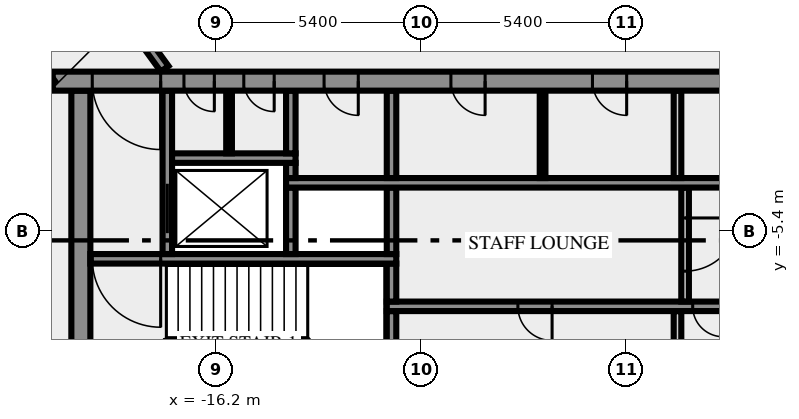
"""IFC4 building model, lengths in metres.
Left out: names, types, materials, properties, quantities, classifications, styles, units other than length and angle.
Written with IfcOpenShell. Run it as: python <this file> out.ifc"""

import sys

from ifc_helpers import new_model, si_unit, direction, frame, frame_2d, origin, place, context, subcontext, project, spatial, rectangle, extrude, element, fill, save


model = new_model("IFC4")
c1 = context("Model", 3, precision=1e-05, world=origin(), true_north=direction((0.0, 1.0)))
c2 = subcontext(c1, "Body", "Model", "MODEL_VIEW")
j1 = project(units=[si_unit("LENGTHUNIT", "METRE"), si_unit("PLANEANGLEUNIT", "RADIAN")], contexts=[c1])
p1 = place(None, origin())
s1 = spatial("IfcSite", under=j1, at=p1, CompositionType="ELEMENT")
p2 = place(p1, origin())
s2 = spatial("IfcBuilding", under=s1, at=p2, CompositionType="ELEMENT")
p3 = place(p2, frame((0.0, 0.0, 230.0)))
s3 = spatial("IfcBuildingStorey", under=s2, at=p3, CompositionType="ELEMENT", Elevation=230.0)
p4 = place(p3, frame((-19.75, -10.5, 0.0), z_axis=(0.0, 0.0, 1.0), x_axis=(0.0, 1.0, 0.0)))
e1 = element("IfcWall", 1, at=p4, inside=s3, PredefinedType="SHEAR", context=c2, shape_type="SweptSolid", body=[
    extrude(rectangle(XDim=8.8, YDim=0.5, at=frame_2d((4.4, 0.0))), origin(), (0.0, 0.0, 1.0), 3.65),
])
p5 = place(p3, frame((-11.575, -10.5, 0.0), z_axis=(0.0, 0.0, 1.0), x_axis=(0.0, 1.0, 0.0)))
e2 = element("IfcWall", 2, at=p5, inside=s3, PredefinedType="SHEAR", context=c2, shape_type="SweptSolid", body=[
    extrude(rectangle(XDim=3.0, YDim=0.25, at=frame_2d((1.5, 0.0))), origin(), (0.0, 0.0, 1.0), 3.65),
])
p6 = place(p3, frame((-4.05, -10.5, 0.0), z_axis=(0.0, 0.0, 1.0), x_axis=(0.0, 1.0, 0.0)))
e3 = element("IfcWall", 3, at=p6, inside=s3, PredefinedType="SOLIDWALL", context=c2, shape_type="SweptSolid", body=[
    extrude(rectangle(XDim=3.0, YDim=0.2, at=frame_2d((1.5, 0.0))), origin(), (0.0, 0.0, 1.0), 3.65),
])
p7 = place(p3, frame((11.7, -7.375, 0.0), z_axis=(0.0, 0.0, 1.0), x_axis=(-1.0, 0.0, 0.0)))
e4 = element("IfcWall", 4, at=p7, inside=s3, PredefinedType="SHEAR", context=c2, shape_type="SweptSolid", body=[
    extrude(rectangle(XDim=23.4, YDim=0.25, at=frame_2d((11.7, 0.0))), origin(), (0.0, 0.0, 1.0), 3.65),
])
p8 = place(p7, frame((19.05, 0.0, 0.0)))
e5 = element("IfcOpeningElement", 5, at=p8, cuts=e4, PredefinedType="OPENING", context=c2, shape_type="SweptSolid", body=[
    extrude(rectangle(XDim=0.9, YDim=2.1, at=frame_2d((0.45, 1.05))), frame((0.0, 0.135, 0.0), z_axis=(0.0, -1.0, 0.0), x_axis=(1.0, 0.0, 0.0)), (0.0, 0.0, 1.0), 0.27),
])
p9 = place(p7, frame((14.55, 0.0, 0.0)))
e6 = element("IfcOpeningElement", 6, at=p9, cuts=e4, PredefinedType="OPENING", context=c2, shape_type="SweptSolid", body=[
    extrude(rectangle(XDim=0.8, YDim=2.1, at=frame_2d((0.4, 1.05))), frame((0.0, 0.135, 0.0), z_axis=(0.0, -1.0, 0.0), x_axis=(1.0, 0.0, 0.0)), (0.0, 0.0, 1.0), 0.27),
])
p10 = place(p7, frame((12.8, 0.0, 0.0)))
e7 = element("IfcOpeningElement", 7, at=p10, cuts=e4, PredefinedType="OPENING", context=c2, shape_type="SweptSolid", body=[
    extrude(rectangle(XDim=0.9, YDim=2.1, at=frame_2d((0.45, 1.05))), frame((0.0, 0.135, 0.0), z_axis=(0.0, -1.0, 0.0), x_axis=(1.0, 0.0, 0.0)), (0.0, 0.0, 1.0), 0.27),
])
p11 = place(p7, frame((10.7, 0.0, 0.0)))
e8 = element("IfcOpeningElement", 8, at=p11, cuts=e4, PredefinedType="OPENING", context=c2, shape_type="SweptSolid", body=[
    extrude(rectangle(XDim=0.9, YDim=2.1, at=frame_2d((0.45, 1.05))), frame((0.0, 0.135, 0.0), z_axis=(0.0, -1.0, 0.0), x_axis=(1.0, 0.0, 0.0)), (0.0, 0.0, 1.0), 0.27),
])
p12 = place(p7, frame((8.35, 0.0, 0.0)))
e9 = element("IfcOpeningElement", 9, at=p12, cuts=e4, PredefinedType="OPENING", context=c2, shape_type="SweptSolid", body=[
    extrude(rectangle(XDim=1.1, YDim=2.1, at=frame_2d((0.55, 1.05))), frame((0.0, 0.135, 0.0), z_axis=(0.0, -1.0, 0.0), x_axis=(1.0, 0.0, 0.0)), (0.0, 0.0, 1.0), 0.27),
])
p13 = place(p7, frame((5.85, 0.0, 0.0)))
e10 = element("IfcOpeningElement", 10, at=p13, cuts=e4, PredefinedType="OPENING", context=c2, shape_type="SweptSolid", body=[
    extrude(rectangle(XDim=1.1, YDim=2.1, at=frame_2d((0.55, 1.05))), frame((0.0, 0.135, 0.0), z_axis=(0.0, -1.0, 0.0), x_axis=(1.0, 0.0, 0.0)), (0.0, 0.0, 1.0), 0.27),
])
p14 = place(p7, frame((3.35, 0.0, 0.0)))
e11 = element("IfcOpeningElement", 11, at=p14, cuts=e4, PredefinedType="OPENING", context=c2, shape_type="SweptSolid", body=[
    extrude(rectangle(XDim=1.1, YDim=2.1, at=frame_2d((0.55, 1.05))), frame((0.0, 0.135, 0.0), z_axis=(0.0, -1.0, 0.0), x_axis=(1.0, 0.0, 0.0)), (0.0, 0.0, 1.0), 0.27),
])
p15 = place(p7, frame((0.85, 0.0, 0.0)))
e12 = element("IfcOpeningElement", 12, at=p15, cuts=e4, PredefinedType="OPENING", context=c2, shape_type="SweptSolid", body=[
    extrude(rectangle(XDim=1.1, YDim=2.1, at=frame_2d((0.55, 1.05))), frame((0.0, 0.135, 0.0), z_axis=(0.0, -1.0, 0.0), x_axis=(1.0, 0.0, 0.0)), (0.0, 0.0, 1.0), 0.27),
])
p16 = place(p3, frame((-11.575, -7.25, 0.0), z_axis=(0.0, 0.0, 1.0), x_axis=(0.0, 1.0, 0.0)))
e13 = element("IfcWall", 13, at=p16, inside=s3, PredefinedType="SHEAR", context=c2, shape_type="SweptSolid", body=[
    extrude(rectangle(XDim=1.0, YDim=0.25, at=frame_2d((0.5, 0.0))), origin(), (0.0, 0.0, 1.0), 3.65),
])
p17 = place(p3, frame((-3.85, -4.25, 0.0), z_axis=(0.0, 0.0, 1.0), x_axis=(0.0, -1.0, 0.0)))
e14 = element("IfcWall", 14, at=p17, inside=s3, PredefinedType="SOLIDWALL", context=c2, shape_type="SweptSolid", body=[
    extrude(rectangle(XDim=3.0, YDim=0.2, at=frame_2d((1.5, 0.0))), origin(), (0.0, 0.0, 1.0), 3.65),
])
p18 = place(p17, frame((0.8, 0.0, 0.0)))
e15 = element("IfcOpeningElement", 15, at=p18, cuts=e14, PredefinedType="OPENING", context=c2, shape_type="SweptSolid", body=[
    extrude(rectangle(XDim=1.4, YDim=2.1, at=frame_2d((0.7, 1.05))), frame((0.0, 0.11, 0.0), z_axis=(0.0, -1.0, 0.0), x_axis=(1.0, 0.0, 0.0)), (0.0, 0.0, 1.0), 0.22),
])
p19 = place(p3, frame((-11.45, -6.125, 0.0), z_axis=(0.0, 0.0, 1.0), x_axis=(-1.0, 0.0, 0.0)))
e16 = element("IfcWall", 16, at=p19, inside=s3, PredefinedType="SHEAR", context=c2, shape_type="SweptSolid", body=[
    extrude(rectangle(XDim=8.05, YDim=0.25, at=frame_2d((4.025, 0.0))), origin(), (0.0, 0.0, 1.0), 3.65),
])
p20 = place(p19, frame((6.2, 0.0, 0.0)))
e17 = element("IfcOpeningElement", 17, at=p20, cuts=e16, PredefinedType="OPENING", context=c2, shape_type="SweptSolid", body=[
    extrude(rectangle(XDim=1.8, YDim=2.1, at=frame_2d((0.9, 1.05))), frame((0.0, 0.135, 0.0), z_axis=(0.0, -1.0, 0.0), x_axis=(1.0, 0.0, 0.0)), (0.0, 0.0, 1.0), 0.27),
])
p21 = place(p3, frame((-17.475, -6.0, 0.0), z_axis=(0.0, 0.0, 1.0), x_axis=(0.0, 1.0, 0.0)))
e18 = element("IfcWall", 18, at=p21, inside=s3, PredefinedType="SHEAR", context=c2, shape_type="SweptSolid", body=[
    extrude(rectangle(XDim=4.3, YDim=0.25, at=frame_2d((2.15, 0.0))), origin(), (0.0, 0.0, 1.0), 3.65),
])
p22 = place(p21, frame((0.55, 0.0, 0.0)))
e19 = element("IfcOpeningElement", 19, at=p22, cuts=e18, PredefinedType="OPENING", context=c2, shape_type="SweptSolid", body=[
    extrude(rectangle(XDim=1.3, YDim=2.1, at=frame_2d((0.65, 1.05))), frame((0.0, 0.135, 0.0), z_axis=(0.0, -1.0, 0.0), x_axis=(1.0, 0.0, 0.0)), (0.0, 0.0, 1.0), 0.27),
])
for number, where, z_axis, x_axis in (
    (20, (-14.225, -6.0, 0.0), (0.0, 0.0, 1.0), (0.0, 1.0, 0.0)),
    (21, (-11.575, -6.0, 0.0), (0.0, 0.0, 1.0), (0.0, 1.0, 0.0)),
):
    element("IfcWall", number, at=place(p3, frame(where, z_axis=z_axis, x_axis=x_axis)), inside=s3, PredefinedType="SHEAR", context=c2, shape_type="SweptSolid", body=[
        extrude(rectangle(XDim=1.75, YDim=0.25, at=frame_2d((0.875, 0.0))), origin(), (0.0, 0.0, 1.0), 3.65),
    ])
p23 = place(p3, frame((-14.35, -4.125, 0.0), z_axis=(0.0, 0.0, 1.0), x_axis=(1.0, 0.0, 0.0)))
e22 = element("IfcWall", 22, at=p23, inside=s3, PredefinedType="SHEAR", context=c2, shape_type="SweptSolid", body=[
    extrude(rectangle(XDim=12.7, YDim=0.25, at=frame_2d((6.35, 0.0))), origin(), (0.0, 0.0, 1.0), 3.65),
])
p24 = place(p3, frame((-14.225, -4.0, 0.0), z_axis=(0.0, 0.0, 1.0), x_axis=(0.0, 1.0, 0.0)))
e23 = element("IfcWall", 23, at=p24, inside=s3, PredefinedType="SHEAR", context=c2, shape_type="SweptSolid", body=[
    extrude(rectangle(XDim=0.4, YDim=0.25, at=frame_2d((0.2, 0.0))), origin(), (0.0, 0.0, 1.0), 3.65),
])
p25 = place(p3, frame((-11.575, -4.0, 0.0), z_axis=(0.0, 0.0, 1.0), x_axis=(0.0, 1.0, 0.0)))
e24 = element("IfcWall", 24, at=p25, inside=s3, PredefinedType="SHEAR", context=c2, shape_type="SweptSolid", body=[
    extrude(rectangle(XDim=2.3, YDim=0.25, at=frame_2d((1.15, 0.0))), origin(), (0.0, 0.0, 1.0), 3.65),
])
p26 = place(p3, frame((-7.6, -4.0, 0.0), z_axis=(0.0, 0.0, 1.0), x_axis=(0.0, 1.0, 0.0)))
e25 = element("IfcWall", 25, at=p26, inside=s3, PredefinedType="PARTITIONING", context=c2, shape_type="SweptSolid", body=[
    extrude(rectangle(XDim=2.3, YDim=0.15, at=frame_2d((1.15, 0.0))), origin(), (0.0, 0.0, 1.0), 3.65),
])
p27 = place(p3, frame((-4.05, -4.0, 0.0), z_axis=(0.0, 0.0, 1.0), x_axis=(0.0, 1.0, 0.0)))
e26 = element("IfcWall", 26, at=p27, inside=s3, PredefinedType="SOLIDWALL", context=c2, shape_type="SweptSolid", body=[
    extrude(rectangle(XDim=2.3, YDim=0.2, at=frame_2d((1.15, 0.0))), origin(), (0.0, 0.0, 1.0), 3.65),
])
p28 = place(p3, frame((-17.35, -3.475, 0.0), z_axis=(0.0, 0.0, 1.0), x_axis=(1.0, 0.0, 0.0)))
e27 = element("IfcWall", 27, at=p28, inside=s3, PredefinedType="SHEAR", context=c2, shape_type="SweptSolid", body=[
    extrude(rectangle(XDim=3.25, YDim=0.25, at=frame_2d((1.625, 0.0))), origin(), (0.0, 0.0, 1.0), 3.65),
])
p29 = place(p3, frame((-15.85, -3.35, 0.0), z_axis=(0.0, 0.0, 1.0), x_axis=(0.0, 1.0, 0.0)))
e28 = element("IfcWall", 28, at=p29, inside=s3, PredefinedType="PARTITIONING", context=c2, shape_type="SweptSolid", body=[
    extrude(rectangle(XDim=1.65, YDim=0.15, at=frame_2d((0.825, 0.0))), origin(), (0.0, 0.0, 1.0), 3.65),
])
p30 = place(p3, frame((-14.225, -3.35, 0.0), z_axis=(0.0, 0.0, 1.0), x_axis=(0.0, 1.0, 0.0)))
e29 = element("IfcWall", 29, at=p30, inside=s3, PredefinedType="SHEAR", context=c2, shape_type="SweptSolid", body=[
    extrude(rectangle(XDim=1.65, YDim=0.25, at=frame_2d((0.825, 0.0))), origin(), (0.0, 0.0, 1.0), 3.65),
])
p31 = place(p3, frame((20.49, -1.45, 0.0), z_axis=(0.0, 0.0, 1.0), x_axis=(-1.0, 0.0, 0.0)))
e30 = element("IfcWall", 30, at=p31, inside=s3, PredefinedType="SHEAR", context=c2, shape_type="SweptSolid", body=[
    extrude(rectangle(XDim=40.98, YDim=0.5, at=frame_2d((20.49, 0.0))), origin(), (0.0, 0.0, 1.0), 3.65),
])
p32 = place(p31, frame((38.14, 0.0, 0.0)))
e31 = element("IfcOpeningElement", 31, at=p32, cuts=e30, PredefinedType="OPENING", context=c2, shape_type="SweptSolid", body=[
    extrude(rectangle(XDim=1.8, YDim=2.1, at=frame_2d((0.9, 1.05))), frame((0.0, 0.26, 0.0), z_axis=(0.0, -1.0, 0.0), x_axis=(1.0, 0.0, 0.0)), (0.0, 0.0, 1.0), 0.52),
])
p33 = place(p31, frame((36.728, 0.0, 0.0)))
e32 = element("IfcOpeningElement", 32, at=p33, cuts=e30, PredefinedType="OPENING", context=c2, shape_type="SweptSolid", body=[
    extrude(rectangle(XDim=0.8, YDim=2.1, at=frame_2d((0.4, 1.05))), frame((0.0, 0.26, 0.0), z_axis=(0.0, -1.0, 0.0), x_axis=(1.0, 0.0, 0.0)), (0.0, 0.0, 1.0), 0.52),
])
p34 = place(p31, frame((35.153, 0.0, 0.0)))
e33 = element("IfcOpeningElement", 33, at=p34, cuts=e30, PredefinedType="OPENING", context=c2, shape_type="SweptSolid", body=[
    extrude(rectangle(XDim=0.8, YDim=2.1, at=frame_2d((0.4, 1.05))), frame((0.0, 0.26, 0.0), z_axis=(0.0, -1.0, 0.0), x_axis=(1.0, 0.0, 0.0)), (0.0, 0.0, 1.0), 0.52),
])
p35 = place(p31, frame((32.94, 0.0, 0.0)))
e34 = element("IfcOpeningElement", 34, at=p35, cuts=e30, PredefinedType="OPENING", context=c2, shape_type="SweptSolid", body=[
    extrude(rectangle(XDim=0.9, YDim=2.1, at=frame_2d((0.45, 1.05))), frame((0.0, 0.26, 0.0), z_axis=(0.0, -1.0, 0.0), x_axis=(1.0, 0.0, 0.0)), (0.0, 0.0, 1.0), 0.52),
])
p36 = place(p31, frame((29.603, 0.0, 0.0)))
e35 = element("IfcOpeningElement", 35, at=p36, cuts=e30, PredefinedType="OPENING", context=c2, shape_type="SweptSolid", body=[
    extrude(rectangle(XDim=0.9, YDim=2.1, at=frame_2d((0.45, 1.05))), frame((0.0, 0.26, 0.0), z_axis=(0.0, -1.0, 0.0), x_axis=(1.0, 0.0, 0.0)), (0.0, 0.0, 1.0), 0.52),
])
p37 = place(p31, frame((25.877, 0.0, 0.0)))
e36 = element("IfcOpeningElement", 36, at=p37, cuts=e30, PredefinedType="OPENING", context=c2, shape_type="SweptSolid", body=[
    extrude(rectangle(XDim=0.9, YDim=2.1, at=frame_2d((0.45, 1.05))), frame((0.0, 0.26, 0.0), z_axis=(0.0, -1.0, 0.0), x_axis=(1.0, 0.0, 0.0)), (0.0, 0.0, 1.0), 0.52),
])
p38 = place(p31, frame((19.59, 0.0, 0.0)))
e37 = element("IfcOpeningElement", 37, at=p38, cuts=e30, PredefinedType="OPENING", context=c2, shape_type="SweptSolid", body=[
    extrude(rectangle(XDim=2.0, YDim=2.1, at=frame_2d((1.0, 1.05))), frame((0.0, 0.26, 0.0), z_axis=(0.0, -1.0, 0.0), x_axis=(1.0, 0.0, 0.0)), (0.0, 0.0, 1.0), 0.52),
])
p39 = place(p31, frame((7.14, 0.0, 0.0)))
e38 = element("IfcOpeningElement", 38, at=p39, cuts=e30, PredefinedType="OPENING", context=c2, shape_type="SweptSolid", body=[
    extrude(rectangle(XDim=0.9, YDim=2.1, at=frame_2d((0.45, 1.05))), frame((0.0, 0.26, 0.0), z_axis=(0.0, -1.0, 0.0), x_axis=(1.0, 0.0, 0.0)), (0.0, 0.0, 1.0), 0.52),
])
p40 = place(p31, frame((4.19, 0.0, 0.0)))
e39 = element("IfcOpeningElement", 39, at=p40, cuts=e30, PredefinedType="OPENING", context=c2, shape_type="SweptSolid", body=[
    extrude(rectangle(XDim=0.9, YDim=2.1, at=frame_2d((0.45, 1.05))), frame((0.0, 0.26, 0.0), z_axis=(0.0, -1.0, 0.0), x_axis=(1.0, 0.0, 0.0)), (0.0, 0.0, 1.0), 0.52),
])
p41 = place(p31, frame((1.04, 0.0, 0.0)))
e40 = element("IfcOpeningElement", 40, at=p41, cuts=e30, PredefinedType="OPENING", context=c2, shape_type="SweptSolid", body=[
    extrude(rectangle(XDim=1.8, YDim=2.1, at=frame_2d((0.9, 1.05))), frame((0.0, 0.26, 0.0), z_axis=(0.0, -1.0, 0.0), x_axis=(1.0, 0.0, 0.0)), (0.0, 0.0, 1.0), 0.52),
])
p42 = place(p3, frame((-20.531, -1.523, 0.0), z_axis=(0.0, 0.0, 1.0), x_axis=(-0.587781654618, 0.809019608226, 0.0)))
e41 = element("IfcWall", 41, at=p42, inside=s3, PredefinedType="SOLIDWALL", context=c2, shape_type="SweptSolid", body=[
    extrude(rectangle(XDim=33.911, YDim=0.25, at=frame_2d((16.956, 0.0))), origin(), (0.0, 0.0, 1.0), 3.65),
])
p43 = place(p42, frame((14.216, 0.0, 0.0)))
e42 = element("IfcOpeningElement", 42, at=p43, cuts=e41, PredefinedType="OPENING", context=c2, shape_type="SweptSolid", body=[
    extrude(rectangle(XDim=1.0, YDim=2.1, at=frame_2d((0.5, 1.05))), frame((0.0, 0.135, 0.0), z_axis=(0.0, -1.0, 0.0), x_axis=(1.0, 0.0, 0.0)), (0.0, 0.0, 1.0), 0.27),
])
p44 = place(p42, frame((19.715, 0.0, 0.0)))
e43 = element("IfcOpeningElement", 43, at=p44, cuts=e41, PredefinedType="OPENING", context=c2, shape_type="SweptSolid", body=[
    extrude(rectangle(XDim=0.9, YDim=2.1, at=frame_2d((0.45, 1.05))), frame((0.0, 0.135, 0.0), z_axis=(0.0, -1.0, 0.0), x_axis=(1.0, 0.0, 0.0)), (0.0, 0.0, 1.0), 0.27),
])
p45 = place(p42, frame((21.316, 0.0, 0.0)))
e44 = element("IfcOpeningElement", 44, at=p45, cuts=e41, PredefinedType="OPENING", context=c2, shape_type="SweptSolid", body=[
    extrude(rectangle(XDim=0.9, YDim=2.1, at=frame_2d((0.45, 1.05))), frame((0.0, 0.135, 0.0), z_axis=(0.0, -1.0, 0.0), x_axis=(1.0, 0.0, 0.0)), (0.0, 0.0, 1.0), 0.27),
])
p46 = place(p3, frame((-38.32, 27.469, 0.0), z_axis=(0.0, 0.0, 1.0), x_axis=(0.587788021768, -0.809014982226, 0.0)))
e45 = element("IfcWall", 45, at=p46, inside=s3, PredefinedType="SOLIDWALL", context=c2, shape_type="SweptSolid", body=[
    extrude(rectangle(XDim=35.344, YDim=0.25, at=frame_2d((17.672, 0.0))), origin(), (0.0, 0.0, 1.0), 3.65),
])
p47 = place(p46, frame((31.003, 0.0, 0.0)))
e46 = element("IfcOpeningElement", 46, at=p47, cuts=e45, PredefinedType="OPENING", context=c2, shape_type="SweptSolid", body=[
    extrude(rectangle(XDim=0.9, YDim=2.1, at=frame_2d((0.45, 1.05))), frame((0.0, 0.135, 0.0), z_axis=(0.0, -1.0, 0.0), x_axis=(1.0, 0.0, 0.0)), (0.0, 0.0, 1.0), 0.27),
])
p48 = place(p46, frame((11.286, 0.0, 0.0)))
e47 = element("IfcOpeningElement", 47, at=p48, cuts=e45, PredefinedType="OPENING", context=c2, shape_type="SweptSolid", body=[
    extrude(rectangle(XDim=0.9, YDim=2.1, at=frame_2d((0.45, 1.05))), frame((0.0, 0.135, 0.0), z_axis=(0.0, -1.0, 0.0), x_axis=(1.0, 0.0, 0.0)), (0.0, 0.0, 1.0), 0.27),
])
p49 = place(p8, origin())
e48 = element("IfcDoor", 48, at=p49, inside=s3, OperationType="SINGLE_SWING_RIGHT", PredefinedType="DOOR", context=c2, shape_type="SweptSolid", body=[
    extrude(rectangle(XDim=0.9, YDim=2.1, at=frame_2d((0.45, 1.05))), frame((0.0, 0.025, 0.0), z_axis=(0.0, -1.0, 0.0), x_axis=(1.0, 0.0, 0.0)), (0.0, 0.0, 1.0), 0.05),
])
fill(e5, e48)
p50 = place(p9, origin())
e49 = element("IfcDoor", 49, at=p50, inside=s3, OperationType="SINGLE_SWING_RIGHT", PredefinedType="DOOR", context=c2, shape_type="SweptSolid", body=[
    extrude(rectangle(XDim=0.8, YDim=2.1, at=frame_2d((0.4, 1.05))), frame((0.0, 0.025, 0.0), z_axis=(0.0, -1.0, 0.0), x_axis=(1.0, 0.0, 0.0)), (0.0, 0.0, 1.0), 0.05),
])
fill(e6, e49)
p51 = place(p18, origin())
e50 = element("IfcDoor", 50, at=p51, inside=s3, OperationType="DOUBLE_DOOR_SINGLE_SWING", PredefinedType="DOOR", context=c2, shape_type="SweptSolid", body=[
    extrude(rectangle(XDim=1.4, YDim=2.1, at=frame_2d((0.7, 1.05))), frame((0.0, 0.025, 0.0), z_axis=(0.0, -1.0, 0.0), x_axis=(1.0, 0.0, 0.0)), (0.0, 0.0, 1.0), 0.05),
])
fill(e15, e50)
p52 = place(p20, origin())
e51 = element("IfcDoor", 51, at=p52, inside=s3, OperationType="DOUBLE_DOOR_SINGLE_SWING", PredefinedType="DOOR", context=c2, shape_type="SweptSolid", body=[
    extrude(rectangle(XDim=1.8, YDim=2.1, at=frame_2d((0.9, 1.05))), frame((0.0, 0.025, 0.0), z_axis=(0.0, -1.0, 0.0), x_axis=(1.0, 0.0, 0.0)), (0.0, 0.0, 1.0), 0.05),
])
fill(e17, e51)
p53 = place(p22, origin())
e52 = element("IfcDoor", 52, at=p53, inside=s3, OperationType="DOUBLE_DOOR_SLIDING", PredefinedType="DOOR", context=c2, shape_type="SweptSolid", body=[
    extrude(rectangle(XDim=1.3, YDim=2.1, at=frame_2d((0.65, 1.05))), frame((0.0, 0.025, 0.0), z_axis=(0.0, -1.0, 0.0), x_axis=(1.0, 0.0, 0.0)), (0.0, 0.0, 1.0), 0.05),
])
fill(e19, e52)
p54 = place(p32, origin())
e53 = element("IfcDoor", 53, at=p54, inside=s3, OperationType="DOUBLE_DOOR_SINGLE_SWING", PredefinedType="DOOR", context=c2, shape_type="SweptSolid", body=[
    extrude(rectangle(XDim=1.8, YDim=2.1, at=frame_2d((0.9, 1.05))), frame((0.0, 0.025, 0.0), z_axis=(0.0, -1.0, 0.0), x_axis=(1.0, 0.0, 0.0)), (0.0, 0.0, 1.0), 0.05),
])
fill(e31, e53)
p55 = place(p33, origin())
e54 = element("IfcDoor", 54, at=p55, inside=s3, OperationType="SINGLE_SWING_RIGHT", PredefinedType="DOOR", context=c2, shape_type="SweptSolid", body=[
    extrude(rectangle(XDim=0.8, YDim=2.1, at=frame_2d((0.4, 1.05))), frame((0.0, 0.025, 0.0), z_axis=(0.0, -1.0, 0.0), x_axis=(1.0, 0.0, 0.0)), (0.0, 0.0, 1.0), 0.05),
])
fill(e32, e54)
p56 = place(p34, origin())
e55 = element("IfcDoor", 55, at=p56, inside=s3, OperationType="SINGLE_SWING_RIGHT", PredefinedType="DOOR", context=c2, shape_type="SweptSolid", body=[
    extrude(rectangle(XDim=0.8, YDim=2.1, at=frame_2d((0.4, 1.05))), frame((0.0, 0.025, 0.0), z_axis=(0.0, -1.0, 0.0), x_axis=(1.0, 0.0, 0.0)), (0.0, 0.0, 1.0), 0.05),
])
fill(e33, e55)
p57 = place(p35, origin())
e56 = element("IfcDoor", 56, at=p57, inside=s3, OperationType="SINGLE_SWING_RIGHT", PredefinedType="DOOR", context=c2, shape_type="SweptSolid", body=[
    extrude(rectangle(XDim=0.9, YDim=2.1, at=frame_2d((0.45, 1.05))), frame((0.0, 0.025, 0.0), z_axis=(0.0, -1.0, 0.0), x_axis=(1.0, 0.0, 0.0)), (0.0, 0.0, 1.0), 0.05),
])
fill(e34, e56)
p58 = place(p36, origin())
e57 = element("IfcDoor", 57, at=p58, inside=s3, OperationType="SINGLE_SWING_RIGHT", PredefinedType="DOOR", context=c2, shape_type="SweptSolid", body=[
    extrude(rectangle(XDim=0.9, YDim=2.1, at=frame_2d((0.45, 1.05))), frame((0.0, 0.025, 0.0), z_axis=(0.0, -1.0, 0.0), x_axis=(1.0, 0.0, 0.0)), (0.0, 0.0, 1.0), 0.05),
])
fill(e35, e57)
p59 = place(p37, origin())
e58 = element("IfcDoor", 58, at=p59, inside=s3, OperationType="SINGLE_SWING_RIGHT", PredefinedType="DOOR", context=c2, shape_type="SweptSolid", body=[
    extrude(rectangle(XDim=0.9, YDim=2.1, at=frame_2d((0.45, 1.05))), frame((0.0, 0.025, 0.0), z_axis=(0.0, -1.0, 0.0), x_axis=(1.0, 0.0, 0.0)), (0.0, 0.0, 1.0), 0.05),
])
fill(e36, e58)
save(model, sys.argv[1])
